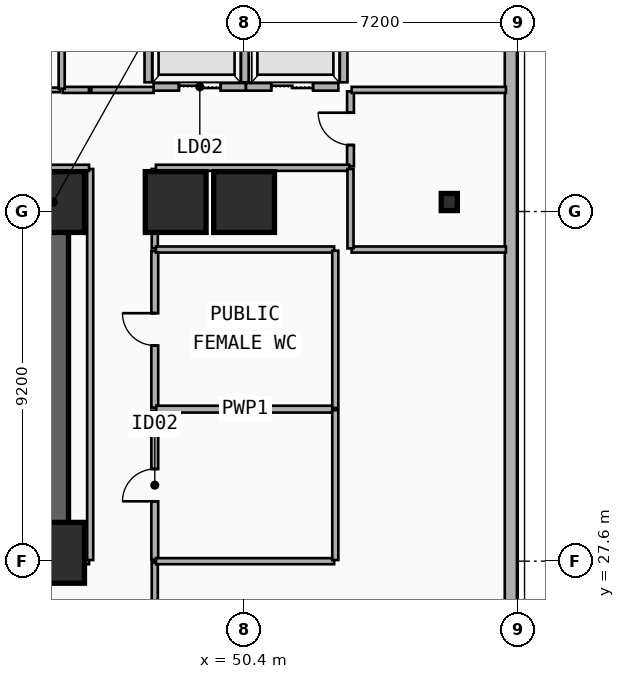
"""IFC4 building model, lengths in metres.
Left out: names, types, materials, properties, quantities, classifications, styles, units other than length and angle.
Written with IfcOpenShell. Run it as: python <this file> out.ifc"""

import sys

from ifc_helpers import new_model, si_unit, direction, frame, frame_2d, origin, origin_2d, place, context, subcontext, project, spatial, rectangle, i_section, extrude, element, fill, save


model = new_model("IFC4")
c1 = context("Model", 3, precision=1e-05, world=origin(), true_north=direction((0.0, 1.0)))
c2 = subcontext(c1, "Body", "Model", "MODEL_VIEW")
j1 = project(units=[si_unit("LENGTHUNIT", "METRE"), si_unit("PLANEANGLEUNIT", "RADIAN")], contexts=[c1])
p1 = place(None, origin())
s1 = spatial("IfcSite", under=j1, at=p1, CompositionType="ELEMENT")
p2 = place(p1, origin())
s2 = spatial("IfcBuilding", under=s1, at=p2, CompositionType="ELEMENT")
p3 = place(p2, frame((0.0, 0.0, 10.4)))
s3 = spatial("IfcBuildingStorey", under=s2, at=p3, CompositionType="ELEMENT", Elevation=10.4)
p4 = place(p3, frame((12.15, 37.05, 0.0), z_axis=(0.0, 0.0, 1.0), x_axis=(1.0, 0.0, 0.0)))
e1 = element("IfcWall", 1, at=p4, inside=s3, PredefinedType="SHEAR", context=c2, shape_type="SweptSolid", body=[
    extrude(rectangle(XDim=33.23, YDim=0.8, at=frame_2d((16.615, 0.0))), origin(), (0.0, 0.0, 1.0), 4.5),
])
p5 = place(p3, frame((45.38, 27.82, 0.0), z_axis=(0.0, 0.0, 1.0), x_axis=(-1.0, 0.0, 0.0)))
e2 = element("IfcWall", 2, at=p5, inside=s3, PredefinedType="SHEAR", context=c2, shape_type="SweptSolid", body=[
    extrude(rectangle(XDim=12.23, YDim=0.8, at=frame_2d((6.115, 0.0))), origin(), (0.0, 0.0, 1.0), 4.5),
])
p6 = place(p5, frame((9.93, 0.0, 0.0)))
e3 = element("IfcOpeningElement", 3, at=p6, cuts=e2, PredefinedType="OPENING", context=c2, shape_type="SweptSolid", body=[
    extrude(rectangle(XDim=1.1, YDim=2.15, at=frame_2d((0.55, 1.075))), frame((0.0, 0.41, 0.0), z_axis=(0.0, -1.0, 0.0), x_axis=(1.0, 0.0, 0.0)), (0.0, 0.0, 1.0), 0.82),
])
p7 = place(p5, frame((6.23, 0.0, 0.0)))
e4 = element("IfcOpeningElement", 4, at=p7, cuts=e2, PredefinedType="OPENING", context=c2, shape_type="SweptSolid", body=[
    extrude(rectangle(XDim=1.1, YDim=2.15, at=frame_2d((0.55, 1.075))), frame((0.0, 0.41, 0.0), z_axis=(0.0, -1.0, 0.0), x_axis=(1.0, 0.0, 0.0)), (0.0, 0.0, 1.0), 0.82),
])
p8 = place(p3, frame((45.38, 28.22, 0.0), z_axis=(0.0, 0.0, 1.0), x_axis=(0.0, 1.0, 0.0)))
e5 = element("IfcWall", 5, at=p8, inside=s3, PredefinedType="SHEAR", context=c2, shape_type="SweptSolid", body=[
    extrude(rectangle(XDim=8.43, YDim=0.8, at=frame_2d((4.215, 0.0))), origin(), (0.0, 0.0, 1.0), 4.5),
])
for number, where, z_axis, x_axis in (
    (6, (45.4, 27.82, 0.0), (0.0, 0.0, 1.0), (1.0, 0.0, 0.0)),
    (7, (45.4, 37.05, 0.0), (0.0, 0.0, 1.0), (1.0, 0.0, 0.0)),
    (8, (48.6, 37.05, 0.0), (0.0, 0.0, 1.0), (1.0, 0.0, 0.0)),
    (9, (50.4, 37.05, 0.0), (0.0, 0.0, 1.0), (1.0, 0.0, 0.0)),
):
    element("IfcColumn", number, at=place(p3, frame(where, z_axis=z_axis, x_axis=x_axis)), inside=s3, PredefinedType="COLUMN", context=c2, shape_type="SweptSolid", body=[
        extrude(rectangle(XDim=1.6, YDim=1.6, at=origin_2d()), origin(), (0.0, 0.0, 1.0), 4.5),
    ])
p9 = place(p3, frame((55.8, 37.05, 0.0), z_axis=(0.0, 0.0, 1.0), x_axis=(1.0, 0.0, 0.0)))
e10 = element("IfcColumn", 10, at=p9, inside=s3, PredefinedType="COLUMN", context=c2, shape_type="SweptSolid", body=[
    extrude(i_section(OverallWidth=0.424, OverallDepth=0.45, WebThickness=0.041, FlangeThickness=0.065, FilletRadius=0.015, at=origin_2d()), origin(), (0.0, 0.0, 1.0), 4.5),
])
p10 = place(p3, frame((57.42, 41.6, 0.0), z_axis=(0.0, 0.0, 1.0), x_axis=(0.0, -1.0, 0.0)))
e11 = element("IfcWall", 11, at=p10, inside=s3, PredefinedType="SOLIDWALL", context=c2, shape_type="SweptSolid", body=[
    extrude(rectangle(XDim=34.4, YDim=0.32, at=frame_2d((17.2, 0.0))), origin(), (0.0, 0.0, 1.0), 4.2),
])
p11 = place(p10, frame((20.727, 0.0, 0.9)))
e12 = element("IfcOpeningElement", 12, at=p11, cuts=e11, PredefinedType="OPENING", context=c2, shape_type="SweptSolid", body=[
    extrude(rectangle(XDim=2.4, YDim=1.8, at=frame_2d((1.2, 0.9))), frame((0.0, 0.17, 0.0), z_axis=(0.0, -1.0, 0.0), x_axis=(1.0, 0.0, 0.0)), (0.0, 0.0, 1.0), 0.34),
])
p12 = place(p10, frame((27.403, 0.0, 0.9)))
e13 = element("IfcOpeningElement", 13, at=p12, cuts=e11, PredefinedType="OPENING", context=c2, shape_type="SweptSolid", body=[
    extrude(rectangle(XDim=2.4, YDim=1.8, at=frame_2d((1.2, 0.9))), frame((0.0, 0.17, 0.0), z_axis=(0.0, -1.0, 0.0), x_axis=(1.0, 0.0, 0.0)), (0.0, 0.0, 1.0), 0.34),
])
p13 = place(p3, frame((48.02, 40.08, 0.0), z_axis=(0.0, 0.0, 1.0), x_axis=(1.0, 0.0, 0.0)))
e14 = element("IfcWall", 14, at=p13, inside=s3, PredefinedType="PARTITIONING", context=c2, shape_type="SweptSolid", body=[
    extrude(rectangle(XDim=2.43, YDim=0.2, at=frame_2d((1.215, 0.0))), origin(), (0.0, 0.0, 1.0), 4.2),
])
p14 = place(p13, frame((0.665, 0.0, 0.0)))
e15 = element("IfcOpeningElement", 15, at=p14, cuts=e14, PredefinedType="OPENING", context=c2, shape_type="SweptSolid", body=[
    extrude(rectangle(XDim=1.1, YDim=2.15, at=frame_2d((0.55, 1.075))), frame((0.0, 0.11, 0.0), z_axis=(0.0, -1.0, 0.0), x_axis=(1.0, 0.0, 0.0)), (0.0, 0.0, 1.0), 0.22),
])
for number, where, z_axis, x_axis in (
    (16, (47.88, 40.2, 0.0), (0.0, 0.0, 1.0), (0.0, 1.0, 0.0)),
    (17, (50.42, 40.2, 0.0), (0.0, 0.0, 1.0), (0.0, 1.0, 0.0)),
):
    element("IfcWall", number, at=place(p3, frame(where, z_axis=z_axis, x_axis=x_axis)), inside=s3, PredefinedType="PARTITIONING", context=c2, shape_type="SweptSolid", body=[
        extrude(rectangle(XDim=2.6, YDim=0.2, at=frame_2d((1.3, 0.0))), origin(), (0.0, 0.0, 1.0), 4.2),
    ])
p15 = place(p3, frame((50.45, 40.08, 0.0), z_axis=(0.0, 0.0, 1.0), x_axis=(1.0, 0.0, 0.0)))
e18 = element("IfcWall", 18, at=p15, inside=s3, PredefinedType="PARTITIONING", context=c2, shape_type="SweptSolid", body=[
    extrude(rectangle(XDim=2.43, YDim=0.2, at=frame_2d((1.215, 0.0))), origin(), (0.0, 0.0, 1.0), 4.2),
])
p16 = place(p15, frame((0.665, 0.0, 0.0)))
e19 = element("IfcOpeningElement", 19, at=p16, cuts=e18, PredefinedType="OPENING", context=c2, shape_type="SweptSolid", body=[
    extrude(rectangle(XDim=1.1, YDim=2.15, at=frame_2d((0.55, 1.075))), frame((0.0, 0.11, 0.0), z_axis=(0.0, -1.0, 0.0), x_axis=(1.0, 0.0, 0.0)), (0.0, 0.0, 1.0), 0.22),
])
p17 = place(p3, frame((53.02, 40.2, 0.0), z_axis=(0.0, 0.0, 1.0), x_axis=(0.0, 1.0, 0.0)))
e20 = element("IfcWall", 20, at=p17, inside=s3, PredefinedType="PARTITIONING", context=c2, shape_type="SweptSolid", body=[
    extrude(rectangle(XDim=2.6, YDim=0.2, at=frame_2d((1.3, 0.0))), origin(), (0.0, 0.0, 1.0), 4.2),
])
p18 = place(p3, frame((48.05, 27.64, 0.0), z_axis=(0.0, 0.0, 1.0), x_axis=(0.0, 1.0, 0.0)))
e21 = element("IfcWall", 21, at=p18, inside=s3, PredefinedType="PLUMBINGWALL", context=c2, shape_type="SweptSolid", body=[
    extrude(rectangle(XDim=3.92, YDim=0.18, at=frame_2d((1.96, 0.0))), origin(), (0.0, 0.0, 1.0), 4.2),
])
p19 = place(p18, frame((1.535, 0.0, 0.0)))
e22 = element("IfcOpeningElement", 22, at=p19, cuts=e21, PredefinedType="OPENING", context=c2, shape_type="SweptSolid", body=[
    extrude(rectangle(XDim=0.85, YDim=2.1, at=frame_2d((0.425, 1.05))), frame((0.0, 0.1, 0.0), z_axis=(0.0, -1.0, 0.0), x_axis=(1.0, 0.0, 0.0)), (0.0, 0.0, 1.0), 0.2),
])
p20 = place(p3, frame((48.05, 31.64, 0.0), z_axis=(0.0, 0.0, 1.0), x_axis=(0.0, 1.0, 0.0)))
e23 = element("IfcWall", 23, at=p20, inside=s3, PredefinedType="PLUMBINGWALL", context=c2, shape_type="SweptSolid", body=[
    extrude(rectangle(XDim=4.12, YDim=0.18, at=frame_2d((2.06, 0.0))), origin(), (0.0, 0.0, 1.0), 4.2),
])
p21 = place(p20, frame((1.635, 0.0, 0.0)))
e24 = element("IfcOpeningElement", 24, at=p21, cuts=e23, PredefinedType="OPENING", context=c2, shape_type="SweptSolid", body=[
    extrude(rectangle(XDim=0.85, YDim=2.1, at=frame_2d((0.425, 1.05))), frame((0.0, 0.1, 0.0), z_axis=(0.0, -1.0, 0.0), x_axis=(1.0, 0.0, 0.0)), (0.0, 0.0, 1.0), 0.2),
])
p22 = place(p3, frame((30.04, 40.0, 0.0), z_axis=(0.0, 0.0, 1.0), x_axis=(1.0, 0.0, 0.0)))
e25 = element("IfcWall", 25, at=p22, inside=s3, PredefinedType="PARTITIONING", context=c2, shape_type="SweptSolid", body=[
    extrude(rectangle(XDim=15.52, YDim=0.12, at=frame_2d((7.76, 0.0))), origin(), (0.0, 0.0, 1.0), 3.53),
])
p23 = place(p22, frame((7.31, 0.0, 0.0)))
e26 = element("IfcOpeningElement", 26, at=p23, cuts=e25, PredefinedType="OPENING", context=c2, shape_type="SweptSolid", body=[
    extrude(rectangle(XDim=0.9, YDim=2.1, at=frame_2d((0.45, 1.05))), frame((0.0, 0.07, 0.0), z_axis=(0.0, -1.0, 0.0), x_axis=(1.0, 0.0, 0.0)), (0.0, 0.0, 1.0), 0.14),
])
p24 = place(p3, frame((53.2, 37.99, 0.0), z_axis=(0.0, 0.0, 1.0), x_axis=(0.0, 1.0, 0.0)))
e27 = element("IfcWall", 27, at=p24, inside=s3, PredefinedType="PLUMBINGWALL", context=c2, shape_type="SweptSolid", body=[
    extrude(rectangle(XDim=1.97, YDim=0.18, at=frame_2d((0.985, 0.0))), origin(), (0.0, 0.0, 1.0), 4.2),
])
p25 = place(p24, frame((0.56, 0.0, 0.0)))
e28 = element("IfcOpeningElement", 28, at=p25, cuts=e27, PredefinedType="OPENING", context=c2, shape_type="SweptSolid", body=[
    extrude(rectangle(XDim=0.85, YDim=2.1, at=frame_2d((0.425, 1.05))), frame((0.0, 0.1, 0.0), z_axis=(0.0, -1.0, 0.0), x_axis=(1.0, 0.0, 0.0)), (0.0, 0.0, 1.0), 0.2),
])
p26 = place(p3, frame((48.09, 31.6, 0.0), z_axis=(0.0, 0.0, 1.0), x_axis=(1.0, 0.0, 0.0)))
e29 = element("IfcWall", 29, at=p26, inside=s3, PredefinedType="PLUMBINGWALL", context=c2, shape_type="SweptSolid", body=[
    extrude(rectangle(XDim=4.67, YDim=0.18, at=frame_2d((2.335, 0.0))), origin(), (0.0, 0.0, 1.0), 4.2),
])
p27 = place(p3, frame((45.41, 27.6, 0.0), z_axis=(0.0, 0.0, 1.0), x_axis=(1.0, 0.0, 0.0)))
e30 = element("IfcWall", 30, at=p27, inside=s3, PredefinedType="PARTITIONING", context=c2, shape_type="SweptSolid", body=[
    extrude(rectangle(XDim=0.91, YDim=0.16, at=frame_2d((0.455, 0.0))), origin(), (0.0, 0.0, 1.0), 3.172),
])
p28 = place(p3, frame((48.05, 25.48, 0.0), z_axis=(0.0, 0.0, 1.0), x_axis=(0.0, 1.0, 0.0)))
e31 = element("IfcWall", 31, at=p28, inside=s3, PredefinedType="PARTITIONING", context=c2, shape_type="SweptSolid", body=[
    extrude(rectangle(XDim=2.09, YDim=0.16, at=frame_2d((1.045, 0.0))), origin(), (0.0, 0.0, 1.0), 4.2),
])
p29 = place(p3, frame((46.38, 40.0, 0.0), z_axis=(0.0, 0.0, 1.0), x_axis=(1.0, 0.0, 0.0)))
e32 = element("IfcWall", 32, at=p29, inside=s3, PredefinedType="PARTITIONING", context=c2, shape_type="SweptSolid", body=[
    extrude(rectangle(XDim=1.64, YDim=0.16, at=frame_2d((0.82, 0.0))), origin(), (0.0, 0.0, 1.0), 4.2),
])
p30 = place(p3, frame((46.35, 27.63, 0.0), z_axis=(0.0, 0.0, 1.0), x_axis=(0.0, 1.0, 0.0)))
e33 = element("IfcWall", 33, at=p30, inside=s3, PredefinedType="PARTITIONING", context=c2, shape_type="SweptSolid", body=[
    extrude(rectangle(XDim=10.29, YDim=0.16, at=frame_2d((5.145, 0.0))), origin(), (0.0, 0.0, 1.0), 4.2),
])
p31 = place(p3, frame((48.05, 35.83, 0.0), z_axis=(0.0, 0.0, 1.0), x_axis=(0.0, 1.0, 0.0)))
e34 = element("IfcWall", 34, at=p31, inside=s3, PredefinedType="PARTITIONING", context=c2, shape_type="SweptSolid", body=[
    extrude(rectangle(XDim=2.09, YDim=0.16, at=frame_2d((1.045, 0.0))), origin(), (0.0, 0.0, 1.0), 4.2),
])
p32 = place(p3, frame((11.28, 37.95, 0.0), z_axis=(0.0, 0.0, 1.0), x_axis=(1.0, 0.0, 0.0)))
e35 = element("IfcWall", 35, at=p32, inside=s3, PredefinedType="PARTITIONING", context=c2, shape_type="SweptSolid", body=[
    extrude(rectangle(XDim=35.04, YDim=0.16, at=frame_2d((17.52, 0.0))), origin(), (0.0, 0.0, 1.0), 3.53),
])
p33 = place(p3, frame((45.63, 40.0, 0.0), z_axis=(0.0, 0.0, 1.0), x_axis=(1.0, 0.0, 0.0)))
e36 = element("IfcWall", 36, at=p33, inside=s3, PredefinedType="PARTITIONING", context=c2, shape_type="SweptSolid", body=[
    extrude(rectangle(XDim=0.69, YDim=0.16, at=frame_2d((0.345, 0.0))), origin(), (0.0, 0.0, 1.0), 3.53),
])
p34 = place(p3, frame((48.08, 37.95, 0.0), z_axis=(0.0, 0.0, 1.0), x_axis=(1.0, 0.0, 0.0)))
e37 = element("IfcWall", 37, at=p34, inside=s3, PredefinedType="PARTITIONING", context=c2, shape_type="SweptSolid", body=[
    extrude(rectangle(XDim=5.09, YDim=0.16, at=frame_2d((2.545, 0.0))), origin(), (0.0, 0.0, 1.0), 4.2),
])
p35 = place(p3, frame((48.08, 27.6, 0.0), z_axis=(0.0, 0.0, 1.0), x_axis=(1.0, 0.0, 0.0)))
e38 = element("IfcWall", 38, at=p35, inside=s3, PredefinedType="PARTITIONING", context=c2, shape_type="SweptSolid", body=[
    extrude(rectangle(XDim=4.69, YDim=0.16, at=frame_2d((2.345, 0.0))), origin(), (0.0, 0.0, 1.0), 4.2),
])
p36 = place(p3, frame((52.8, 27.63, 0.0), z_axis=(0.0, 0.0, 1.0), x_axis=(0.0, 1.0, 0.0)))
e39 = element("IfcWall", 39, at=p36, inside=s3, PredefinedType="PARTITIONING", context=c2, shape_type="SweptSolid", body=[
    extrude(rectangle(XDim=3.94, YDim=0.16, at=frame_2d((1.97, 0.0))), origin(), (0.0, 0.0, 1.0), 4.2),
])
p37 = place(p3, frame((48.08, 35.8, 0.0), z_axis=(0.0, 0.0, 1.0), x_axis=(1.0, 0.0, 0.0)))
e40 = element("IfcWall", 40, at=p37, inside=s3, PredefinedType="PARTITIONING", context=c2, shape_type="SweptSolid", body=[
    extrude(rectangle(XDim=4.69, YDim=0.16, at=frame_2d((2.345, 0.0))), origin(), (0.0, 0.0, 1.0), 4.2),
])
p38 = place(p3, frame((52.8, 31.63, 0.0), z_axis=(0.0, 0.0, 1.0), x_axis=(0.0, 1.0, 0.0)))
e41 = element("IfcWall", 41, at=p38, inside=s3, PredefinedType="PARTITIONING", context=c2, shape_type="SweptSolid", body=[
    extrude(rectangle(XDim=4.14, YDim=0.16, at=frame_2d((2.07, 0.0))), origin(), (0.0, 0.0, 1.0), 4.2),
])
for number, where, z_axis, x_axis in (
    (42, (53.23, 35.8, 0.0), (0.0, 0.0, 1.0), (1.0, 0.0, 0.0)),
    (43, (53.23, 40.0, 0.0), (0.0, 0.0, 1.0), (1.0, 0.0, 0.0)),
):
    element("IfcWall", number, at=place(p3, frame(where, z_axis=z_axis, x_axis=x_axis)), inside=s3, PredefinedType="PARTITIONING", context=c2, shape_type="SweptSolid", body=[
        extrude(rectangle(XDim=4.06, YDim=0.16, at=frame_2d((2.03, 0.0))), origin(), (0.0, 0.0, 1.0), 4.2),
    ])
p39 = place(p3, frame((53.2, 35.83, 0.0), z_axis=(0.0, 0.0, 1.0), x_axis=(0.0, 1.0, 0.0)))
e44 = element("IfcWall", 44, at=p39, inside=s3, PredefinedType="PARTITIONING", context=c2, shape_type="SweptSolid", body=[
    extrude(rectangle(XDim=2.09, YDim=0.16, at=frame_2d((1.045, 0.0))), origin(), (0.0, 0.0, 1.0), 4.2),
])
p40 = place(p3, frame((45.6, 40.03, 0.0), z_axis=(0.0, 0.0, 1.0), x_axis=(0.0, 1.0, 0.0)))
e45 = element("IfcWall", 45, at=p40, inside=s3, PredefinedType="PARTITIONING", context=c2, shape_type="SweptSolid", body=[
    extrude(rectangle(XDim=4.86, YDim=0.16, at=frame_2d((2.43, 0.0))), origin(), (0.0, 0.0, 1.0), 3.53),
])
p41 = place(p14, origin())
e46 = element("IfcDoor", 46, at=p41, inside=s3, OperationType="DOUBLE_DOOR_SLIDING", PredefinedType="DOOR", context=c2, shape_type="SweptSolid", body=[
    extrude(rectangle(XDim=1.1, YDim=2.15, at=frame_2d((0.55, 1.075))), frame((0.0, 0.025, 0.0), z_axis=(0.0, -1.0, 0.0), x_axis=(1.0, 0.0, 0.0)), (0.0, 0.0, 1.0), 0.05),
])
fill(e15, e46)
p42 = place(p16, origin())
e47 = element("IfcDoor", 47, at=p42, inside=s3, OperationType="DOUBLE_DOOR_SLIDING", PredefinedType="DOOR", context=c2, shape_type="SweptSolid", body=[
    extrude(rectangle(XDim=1.1, YDim=2.15, at=frame_2d((0.55, 1.075))), frame((0.0, 0.025, 0.0), z_axis=(0.0, -1.0, 0.0), x_axis=(1.0, 0.0, 0.0)), (0.0, 0.0, 1.0), 0.05),
])
fill(e19, e47)
p43 = place(p19, origin())
e48 = element("IfcDoor", 48, at=p43, inside=s3, OperationType="SINGLE_SWING_LEFT", PredefinedType="DOOR", context=c2, shape_type="SweptSolid", body=[
    extrude(rectangle(XDim=0.85, YDim=2.1, at=frame_2d((0.425, 1.05))), frame((0.0, 0.025, 0.0), z_axis=(0.0, -1.0, 0.0), x_axis=(1.0, 0.0, 0.0)), (0.0, 0.0, 1.0), 0.05),
])
fill(e22, e48)
p44 = place(p21, origin())
e49 = element("IfcDoor", 49, at=p44, inside=s3, OperationType="SINGLE_SWING_RIGHT", PredefinedType="DOOR", context=c2, shape_type="SweptSolid", body=[
    extrude(rectangle(XDim=0.85, YDim=2.1, at=frame_2d((0.425, 1.05))), frame((0.0, 0.025, 0.0), z_axis=(0.0, -1.0, 0.0), x_axis=(1.0, 0.0, 0.0)), (0.0, 0.0, 1.0), 0.05),
])
fill(e24, e49)
p45 = place(p25, origin())
e50 = element("IfcDoor", 50, at=p45, inside=s3, OperationType="SINGLE_SWING_RIGHT", PredefinedType="DOOR", context=c2, shape_type="SweptSolid", body=[
    extrude(rectangle(XDim=0.85, YDim=2.1, at=frame_2d((0.425, 1.05))), frame((0.0, 0.025, 0.0), z_axis=(0.0, -1.0, 0.0), x_axis=(1.0, 0.0, 0.0)), (0.0, 0.0, 1.0), 0.05),
])
fill(e28, e50)
save(model, sys.argv[1])
